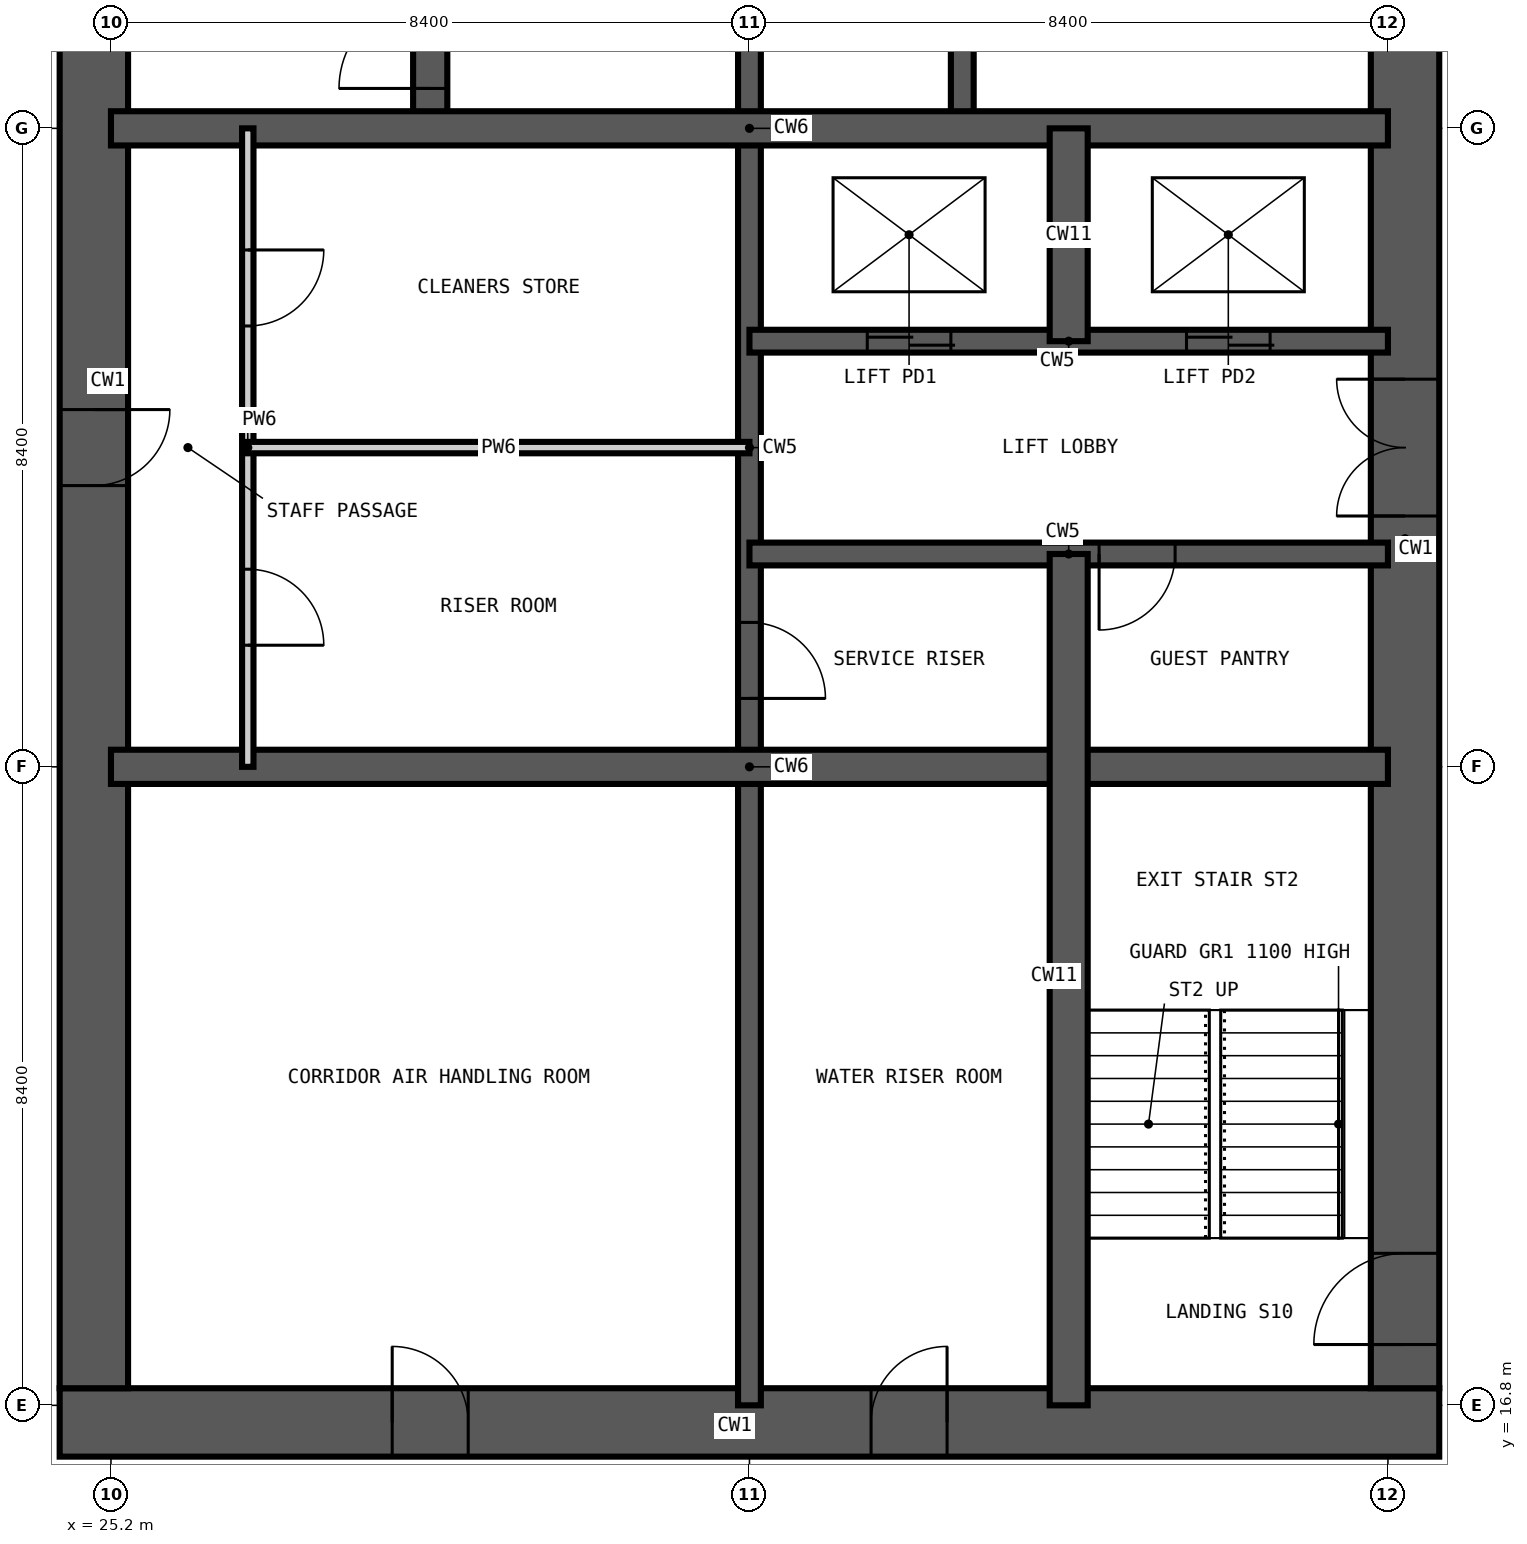
"""IFC4 building model, lengths in metres.
Left out: names, types, materials, properties, quantities, classifications, styles, units other than length and angle.
Written with IfcOpenShell. Run it as: python <this file> out.ifc"""

import sys

from ifc_helpers import new_model, si_unit, direction, frame, frame_2d, origin, place, context, subcontext, project, spatial, rectangle, extrude, element, fill, save


model = new_model("IFC4")
c1 = context("Model", 3, precision=1e-05, world=origin(), true_north=direction((0.0, 1.0)))
c2 = subcontext(c1, "Body", "Model", "MODEL_VIEW")
j1 = project(units=[si_unit("LENGTHUNIT", "METRE"), si_unit("PLANEANGLEUNIT", "RADIAN")], contexts=[c1])
p1 = place(None, origin())
s1 = spatial("IfcSite", under=j1, at=p1, CompositionType="ELEMENT")
p2 = place(p1, origin())
s2 = spatial("IfcBuilding", under=s1, at=p2, CompositionType="ELEMENT")
p3 = place(p2, frame((0.0, 0.0, 233.4)))
s3 = spatial("IfcBuildingStorey", under=s2, at=p3, CompositionType="ELEMENT", Elevation=233.4)
p4 = place(p3, frame((24.525, 16.575, -0.35), z_axis=(0.0, 0.0, 1.0), x_axis=(1.0, 0.0, 0.0)))
e1 = element("IfcWall", 1, at=p4, inside=s3, PredefinedType="SHEAR", context=c2, shape_type="SweptSolid", body=[
    extrude(rectangle(XDim=18.15, YDim=0.9, at=frame_2d((9.075, 0.0))), origin(), (0.0, 0.0, 1.0), 3.9),
])
p5 = place(p4, frame((4.375, 0.0, 0.35)))
e2 = element("IfcOpeningElement", 2, at=p5, cuts=e1, PredefinedType="OPENING", context=c2, shape_type="SweptSolid", body=[
    extrude(rectangle(XDim=1.0, YDim=2.1, at=frame_2d((0.5, 1.05))), frame((0.0, 0.46, 0.0), z_axis=(0.0, -1.0, 0.0), x_axis=(1.0, 0.0, 0.0)), (0.0, 0.0, 1.0), 0.92),
])
p6 = place(p4, frame((10.675, 0.0, 0.35)))
e3 = element("IfcOpeningElement", 3, at=p6, cuts=e1, PredefinedType="OPENING", context=c2, shape_type="SweptSolid", body=[
    extrude(rectangle(XDim=1.0, YDim=2.1, at=frame_2d((0.5, 1.05))), frame((0.0, 0.46, 0.0), z_axis=(0.0, -1.0, 0.0), x_axis=(1.0, 0.0, 0.0)), (0.0, 0.0, 1.0), 0.92),
])
p7 = place(p3, frame((42.225, 17.025, -0.35), z_axis=(0.0, 0.0, 1.0), x_axis=(0.0, 1.0, 0.0)))
e4 = element("IfcWall", 4, at=p7, inside=s3, PredefinedType="SHEAR", context=c2, shape_type="SweptSolid", body=[
    extrude(rectangle(XDim=24.75, YDim=0.9, at=frame_2d((12.375, 0.0))), origin(), (0.0, 0.0, 1.0), 3.9),
])
p8 = place(p7, frame((0.575, 0.0, 0.35)))
e5 = element("IfcOpeningElement", 5, at=p8, cuts=e4, PredefinedType="OPENING", context=c2, shape_type="SweptSolid", body=[
    extrude(rectangle(XDim=1.2, YDim=2.2, at=frame_2d((0.6, 1.1))), frame((0.0, 0.46, 0.0), z_axis=(0.0, -1.0, 0.0), x_axis=(1.0, 0.0, 0.0)), (0.0, 0.0, 1.0), 0.92),
])
p9 = place(p7, frame((11.475, 0.0, 0.35)))
e6 = element("IfcOpeningElement", 6, at=p9, cuts=e4, PredefinedType="OPENING", context=c2, shape_type="SweptSolid", body=[
    extrude(rectangle(XDim=1.8, YDim=2.2, at=frame_2d((0.9, 1.1))), frame((0.0, 0.46, 0.0), z_axis=(0.0, -1.0, 0.0), x_axis=(1.0, 0.0, 0.0)), (0.0, 0.0, 1.0), 0.92),
])
p10 = place(p7, frame((20.275, 0.0, 0.35)))
e7 = element("IfcOpeningElement", 7, at=p10, cuts=e4, PredefinedType="OPENING", context=c2, shape_type="SweptSolid", body=[
    extrude(rectangle(XDim=1.0, YDim=2.1, at=frame_2d((0.5, 1.05))), frame((0.0, 0.46, 0.0), z_axis=(0.0, -1.0, 0.0), x_axis=(1.0, 0.0, 0.0)), (0.0, 0.0, 1.0), 0.92),
])
p11 = place(p3, frame((24.975, 41.775, -0.35), z_axis=(0.0, 0.0, 1.0), x_axis=(0.0, -1.0, 0.0)))
e8 = element("IfcWall", 8, at=p11, inside=s3, PredefinedType="SHEAR", context=c2, shape_type="SweptSolid", body=[
    extrude(rectangle(XDim=24.75, YDim=0.9, at=frame_2d((12.375, 0.0))), origin(), (0.0, 0.0, 1.0), 3.9),
])
p12 = place(p11, frame((11.875, 0.0, 0.35)))
e9 = element("IfcOpeningElement", 9, at=p12, cuts=e8, PredefinedType="OPENING", context=c2, shape_type="SweptSolid", body=[
    extrude(rectangle(XDim=1.0, YDim=2.1, at=frame_2d((0.5, 1.05))), frame((0.0, 0.46, 0.0), z_axis=(0.0, -1.0, 0.0), x_axis=(1.0, 0.0, 0.0)), (0.0, 0.0, 1.0), 0.92),
])
p13 = place(p3, frame((33.6, 16.8, -0.35), z_axis=(0.0, 0.0, 1.0), x_axis=(0.0, 1.0, 0.0)))
e10 = element("IfcWall", 10, at=p13, inside=s3, PredefinedType="SHEAR", context=c2, shape_type="SweptSolid", body=[
    extrude(rectangle(XDim=25.2, YDim=0.3, at=frame_2d((12.6, 0.0))), origin(), (0.0, 0.0, 1.0), 3.9),
])
p14 = place(p13, frame((22.5, 0.0, 0.35)))
e11 = element("IfcOpeningElement", 11, at=p14, cuts=e10, PredefinedType="OPENING", context=c2, shape_type="SweptSolid", body=[
    extrude(rectangle(XDim=1.2, YDim=2.2, at=frame_2d((0.6, 1.1))), frame((0.0, 0.16, 0.0), z_axis=(0.0, -1.0, 0.0), x_axis=(1.0, 0.0, 0.0)), (0.0, 0.0, 1.0), 0.32),
])
p15 = place(p13, frame((18.3, 0.0, 0.35)))
e12 = element("IfcOpeningElement", 12, at=p15, cuts=e10, PredefinedType="OPENING", context=c2, shape_type="SweptSolid", body=[
    extrude(rectangle(XDim=1.2, YDim=2.2, at=frame_2d((0.6, 1.1))), frame((0.0, 0.16, 0.0), z_axis=(0.0, -1.0, 0.0), x_axis=(1.0, 0.0, 0.0)), (0.0, 0.0, 1.0), 0.32),
])
p16 = place(p13, frame((9.3, 0.0, 0.35)))
e13 = element("IfcOpeningElement", 13, at=p16, cuts=e10, PredefinedType="OPENING", context=c2, shape_type="SweptSolid", body=[
    extrude(rectangle(XDim=1.0, YDim=2.1, at=frame_2d((0.5, 1.05))), frame((0.0, 0.16, 0.0), z_axis=(0.0, -1.0, 0.0), x_axis=(1.0, 0.0, 0.0)), (0.0, 0.0, 1.0), 0.32),
])
p17 = place(p3, frame((36.4, 33.6, -0.35), z_axis=(0.0, 0.0, 1.0), x_axis=(0.0, 1.0, 0.0)))
e14 = element("IfcWall", 14, at=p17, inside=s3, PredefinedType="SHEAR", context=c2, shape_type="SweptSolid", body=[
    extrude(rectangle(XDim=8.4, YDim=0.3, at=frame_2d((4.2, 0.0))), origin(), (0.0, 0.0, 1.0), 3.9),
])
p18 = place(p3, frame((33.6, 28.0, -0.35), z_axis=(0.0, 0.0, 1.0), x_axis=(1.0, 0.0, 0.0)))
e15 = element("IfcWall", 15, at=p18, inside=s3, PredefinedType="SHEAR", context=c2, shape_type="SweptSolid", body=[
    extrude(rectangle(XDim=8.4, YDim=0.3, at=frame_2d((4.2, 0.0))), origin(), (0.0, 0.0, 1.0), 3.9),
])
p19 = place(p18, frame((4.6, 0.0, 0.35)))
e16 = element("IfcOpeningElement", 16, at=p19, cuts=e15, PredefinedType="OPENING", context=c2, shape_type="SweptSolid", body=[
    extrude(rectangle(XDim=1.0, YDim=2.1, at=frame_2d((0.5, 1.05))), frame((0.0, 0.16, 0.0), z_axis=(0.0, -1.0, 0.0), x_axis=(1.0, 0.0, 0.0)), (0.0, 0.0, 1.0), 0.32),
])
p20 = place(p3, frame((33.6, 30.8, -0.35), z_axis=(0.0, 0.0, 1.0), x_axis=(1.0, 0.0, 0.0)))
e17 = element("IfcWall", 17, at=p20, inside=s3, PredefinedType="SHEAR", context=c2, shape_type="SweptSolid", body=[
    extrude(rectangle(XDim=8.4, YDim=0.3, at=frame_2d((4.2, 0.0))), origin(), (0.0, 0.0, 1.0), 3.9),
])
p21 = place(p20, frame((1.55, 0.0, 0.35)))
e18 = element("IfcOpeningElement", 18, at=p21, cuts=e17, PredefinedType="OPENING", context=c2, shape_type="SweptSolid", body=[
    extrude(rectangle(XDim=1.1, YDim=2.2, at=frame_2d((0.55, 1.1))), frame((0.0, 0.16, 0.0), z_axis=(0.0, -1.0, 0.0), x_axis=(1.0, 0.0, 0.0)), (0.0, 0.0, 1.0), 0.32),
])
p22 = place(p20, frame((5.75, 0.0, 0.35)))
e19 = element("IfcOpeningElement", 19, at=p22, cuts=e17, PredefinedType="OPENING", context=c2, shape_type="SweptSolid", body=[
    extrude(rectangle(XDim=1.1, YDim=2.2, at=frame_2d((0.55, 1.1))), frame((0.0, 0.16, 0.0), z_axis=(0.0, -1.0, 0.0), x_axis=(1.0, 0.0, 0.0)), (0.0, 0.0, 1.0), 0.32),
])
p23 = place(p3, frame((29.4, 33.6, -0.35), z_axis=(0.0, 0.0, 1.0), x_axis=(0.0, 1.0, 0.0)))
e20 = element("IfcWall", 20, at=p23, inside=s3, PredefinedType="SHEAR", context=c2, shape_type="SweptSolid", body=[
    extrude(rectangle(XDim=8.4, YDim=0.45, at=frame_2d((4.2, 0.0))), origin(), (0.0, 0.0, 1.0), 3.9),
])
p24 = place(p23, frame((0.525, 0.0, 0.35)))
e21 = element("IfcOpeningElement", 21, at=p24, cuts=e20, PredefinedType="OPENING", context=c2, shape_type="SweptSolid", body=[
    extrude(rectangle(XDim=1.2, YDim=2.2, at=frame_2d((0.6, 1.1))), frame((0.0, 0.235, 0.0), z_axis=(0.0, -1.0, 0.0), x_axis=(1.0, 0.0, 0.0)), (0.0, 0.0, 1.0), 0.47),
])
for number, where, z_axis, x_axis in (
    (22, (25.2, 25.2, -0.35), (0.0, 0.0, 1.0), (1.0, 0.0, 0.0)),
    (23, (25.2, 33.6, -0.35), (0.0, 0.0, 1.0), (1.0, 0.0, 0.0)),
):
    element("IfcWall", number, at=place(p3, frame(where, z_axis=z_axis, x_axis=x_axis)), inside=s3, PredefinedType="SHEAR", context=c2, shape_type="SweptSolid", body=[
        extrude(rectangle(XDim=16.8, YDim=0.45, at=frame_2d((8.4, 0.0))), origin(), (0.0, 0.0, 1.0), 3.9),
    ])
p25 = place(p3, frame((37.8, 16.8, -0.35), z_axis=(0.0, 0.0, 1.0), x_axis=(0.0, 1.0, 0.0)))
e24 = element("IfcWall", 24, at=p25, inside=s3, PredefinedType="SHEAR", context=c2, shape_type="SweptSolid", body=[
    extrude(rectangle(XDim=11.2, YDim=0.5, at=frame_2d((5.6, 0.0))), origin(), (0.0, 0.0, 1.0), 3.9),
])
p26 = place(p3, frame((37.8, 30.8, -0.35), z_axis=(0.0, 0.0, 1.0), x_axis=(0.0, 1.0, 0.0)))
e25 = element("IfcWall", 25, at=p26, inside=s3, PredefinedType="SHEAR", context=c2, shape_type="SweptSolid", body=[
    extrude(rectangle(XDim=2.8, YDim=0.5, at=frame_2d((1.4, 0.0))), origin(), (0.0, 0.0, 1.0), 3.9),
])
p27 = place(p3, frame((27.0, 25.2, 0.0), z_axis=(0.0, 0.0, 1.0), x_axis=(0.0, 1.0, 0.0)))
e26 = element("IfcWall", 26, at=p27, inside=s3, PredefinedType="PARTITIONING", context=c2, shape_type="SweptSolid", body=[
    extrude(rectangle(XDim=8.4, YDim=0.15, at=frame_2d((4.2, 0.0))), origin(), (0.0, 0.0, 1.0), 3.55),
])
p28 = place(p27, frame((1.6, 0.0, 0.0)))
e27 = element("IfcOpeningElement", 27, at=p28, cuts=e26, PredefinedType="OPENING", context=c2, shape_type="SweptSolid", body=[
    extrude(rectangle(XDim=1.0, YDim=2.1, at=frame_2d((0.5, 1.05))), frame((0.0, 0.085, 0.0), z_axis=(0.0, -1.0, 0.0), x_axis=(1.0, 0.0, 0.0)), (0.0, 0.0, 1.0), 0.17),
])
p29 = place(p27, frame((5.8, 0.0, 0.0)))
e28 = element("IfcOpeningElement", 28, at=p29, cuts=e26, PredefinedType="OPENING", context=c2, shape_type="SweptSolid", body=[
    extrude(rectangle(XDim=1.0, YDim=2.1, at=frame_2d((0.5, 1.05))), frame((0.0, 0.085, 0.0), z_axis=(0.0, -1.0, 0.0), x_axis=(1.0, 0.0, 0.0)), (0.0, 0.0, 1.0), 0.17),
])
p30 = place(p3, frame((27.0, 29.4, 0.0), z_axis=(0.0, 0.0, 1.0), x_axis=(1.0, 0.0, 0.0)))
e29 = element("IfcWall", 29, at=p30, inside=s3, PredefinedType="PARTITIONING", context=c2, shape_type="SweptSolid", body=[
    extrude(rectangle(XDim=6.6, YDim=0.15, at=frame_2d((3.3, 0.0))), origin(), (0.0, 0.0, 1.0), 3.55),
])
p31 = place(p24, origin())
e30 = element("IfcDoor", 30, at=p31, inside=s3, OperationType="SINGLE_SWING_LEFT", PredefinedType="DOOR", context=c2, shape_type="SweptSolid", body=[
    extrude(rectangle(XDim=1.2, YDim=2.2, at=frame_2d((0.6, 1.1))), frame((0.0, 0.025, 0.0), z_axis=(0.0, -1.0, 0.0), x_axis=(1.0, 0.0, 0.0)), (0.0, 0.0, 1.0), 0.05),
])
fill(e21, e30)
p32 = place(p8, origin())
e31 = element("IfcDoor", 31, at=p32, inside=s3, OperationType="SINGLE_SWING_LEFT", PredefinedType="DOOR", context=c2, shape_type="SweptSolid", body=[
    extrude(rectangle(XDim=1.2, YDim=2.2, at=frame_2d((0.6, 1.1))), frame((0.0, 0.025, 0.0), z_axis=(0.0, -1.0, 0.0), x_axis=(1.0, 0.0, 0.0)), (0.0, 0.0, 1.0), 0.05),
])
fill(e5, e31)
p33 = place(p21, origin())
e32 = element("IfcDoor", 32, at=p33, inside=s3, OperationType="DOUBLE_DOOR_SLIDING", PredefinedType="DOOR", context=c2, shape_type="SweptSolid", body=[
    extrude(rectangle(XDim=1.1, YDim=2.2, at=frame_2d((0.55, 1.1))), frame((0.0, 0.025, 0.0), z_axis=(0.0, -1.0, 0.0), x_axis=(1.0, 0.0, 0.0)), (0.0, 0.0, 1.0), 0.05),
])
fill(e18, e32)
p34 = place(p22, origin())
e33 = element("IfcDoor", 33, at=p34, inside=s3, OperationType="DOUBLE_DOOR_SLIDING", PredefinedType="DOOR", context=c2, shape_type="SweptSolid", body=[
    extrude(rectangle(XDim=1.1, YDim=2.2, at=frame_2d((0.55, 1.1))), frame((0.0, 0.025, 0.0), z_axis=(0.0, -1.0, 0.0), x_axis=(1.0, 0.0, 0.0)), (0.0, 0.0, 1.0), 0.05),
])
fill(e19, e33)
p35 = place(p12, origin())
e34 = element("IfcDoor", 34, at=p35, inside=s3, OperationType="SINGLE_SWING_LEFT", PredefinedType="DOOR", context=c2, shape_type="SweptSolid", body=[
    extrude(rectangle(XDim=1.0, YDim=2.1, at=frame_2d((0.5, 1.05))), frame((0.0, 0.025, 0.0), z_axis=(0.0, -1.0, 0.0), x_axis=(1.0, 0.0, 0.0)), (0.0, 0.0, 1.0), 0.05),
])
fill(e9, e34)
p36 = place(p28, frame((1.0, 0.0, 0.0), z_axis=(0.0, 0.0, 1.0), x_axis=(-1.0, 0.0, 0.0)))
e35 = element("IfcDoor", 35, at=p36, inside=s3, OperationType="SINGLE_SWING_RIGHT", PredefinedType="DOOR", context=c2, shape_type="SweptSolid", body=[
    extrude(rectangle(XDim=1.0, YDim=2.1, at=frame_2d((0.5, 1.05))), frame((0.0, 0.025, 0.0), z_axis=(0.0, -1.0, 0.0), x_axis=(1.0, 0.0, 0.0)), (0.0, 0.0, 1.0), 0.05),
])
fill(e27, e35)
p37 = place(p29, frame((1.0, 0.0, 0.0), z_axis=(0.0, 0.0, 1.0), x_axis=(-1.0, 0.0, 0.0)))
e36 = element("IfcDoor", 36, at=p37, inside=s3, OperationType="SINGLE_SWING_LEFT", PredefinedType="DOOR", context=c2, shape_type="SweptSolid", body=[
    extrude(rectangle(XDim=1.0, YDim=2.1, at=frame_2d((0.5, 1.05))), frame((0.0, 0.025, 0.0), z_axis=(0.0, -1.0, 0.0), x_axis=(1.0, 0.0, 0.0)), (0.0, 0.0, 1.0), 0.05),
])
fill(e28, e36)
p38 = place(p16, frame((1.0, 0.0, 0.0), z_axis=(0.0, 0.0, 1.0), x_axis=(-1.0, 0.0, 0.0)))
e37 = element("IfcDoor", 37, at=p38, inside=s3, OperationType="SINGLE_SWING_RIGHT", PredefinedType="DOOR", context=c2, shape_type="SweptSolid", body=[
    extrude(rectangle(XDim=1.0, YDim=2.1, at=frame_2d((0.5, 1.05))), frame((0.0, 0.025, 0.0), z_axis=(0.0, -1.0, 0.0), x_axis=(1.0, 0.0, 0.0)), (0.0, 0.0, 1.0), 0.05),
])
fill(e13, e37)
p39 = place(p19, frame((1.0, 0.0, 0.0), z_axis=(0.0, 0.0, 1.0), x_axis=(-1.0, 0.0, 0.0)))
e38 = element("IfcDoor", 38, at=p39, inside=s3, OperationType="SINGLE_SWING_RIGHT", PredefinedType="DOOR", context=c2, shape_type="SweptSolid", body=[
    extrude(rectangle(XDim=1.0, YDim=2.1, at=frame_2d((0.5, 1.05))), frame((0.0, 0.025, 0.0), z_axis=(0.0, -1.0, 0.0), x_axis=(1.0, 0.0, 0.0)), (0.0, 0.0, 1.0), 0.05),
])
fill(e16, e38)
p40 = place(p9, origin())
e39 = element("IfcDoor", 39, at=p40, inside=s3, OperationType="DOUBLE_DOOR_DOUBLE_SWING", PredefinedType="DOOR", context=c2, shape_type="SweptSolid", body=[
    extrude(rectangle(XDim=1.8, YDim=2.2, at=frame_2d((0.9, 1.1))), frame((0.0, 0.025, 0.0), z_axis=(0.0, -1.0, 0.0), x_axis=(1.0, 0.0, 0.0)), (0.0, 0.0, 1.0), 0.05),
])
fill(e6, e39)
p41 = place(p5, origin())
e40 = element("IfcDoor", 40, at=p41, inside=s3, OperationType="SINGLE_SWING_LEFT", PredefinedType="DOOR", context=c2, shape_type="SweptSolid", body=[
    extrude(rectangle(XDim=1.0, YDim=2.1, at=frame_2d((0.5, 1.05))), frame((0.0, 0.025, 0.0), z_axis=(0.0, -1.0, 0.0), x_axis=(1.0, 0.0, 0.0)), (0.0, 0.0, 1.0), 0.05),
])
fill(e2, e40)
p42 = place(p6, origin())
e41 = element("IfcDoor", 41, at=p42, inside=s3, OperationType="SINGLE_SWING_RIGHT", PredefinedType="DOOR", context=c2, shape_type="SweptSolid", body=[
    extrude(rectangle(XDim=1.0, YDim=2.1, at=frame_2d((0.5, 1.05))), frame((0.0, 0.025, 0.0), z_axis=(0.0, -1.0, 0.0), x_axis=(1.0, 0.0, 0.0)), (0.0, 0.0, 1.0), 0.05),
])
fill(e3, e41)
save(model, sys.argv[1])
